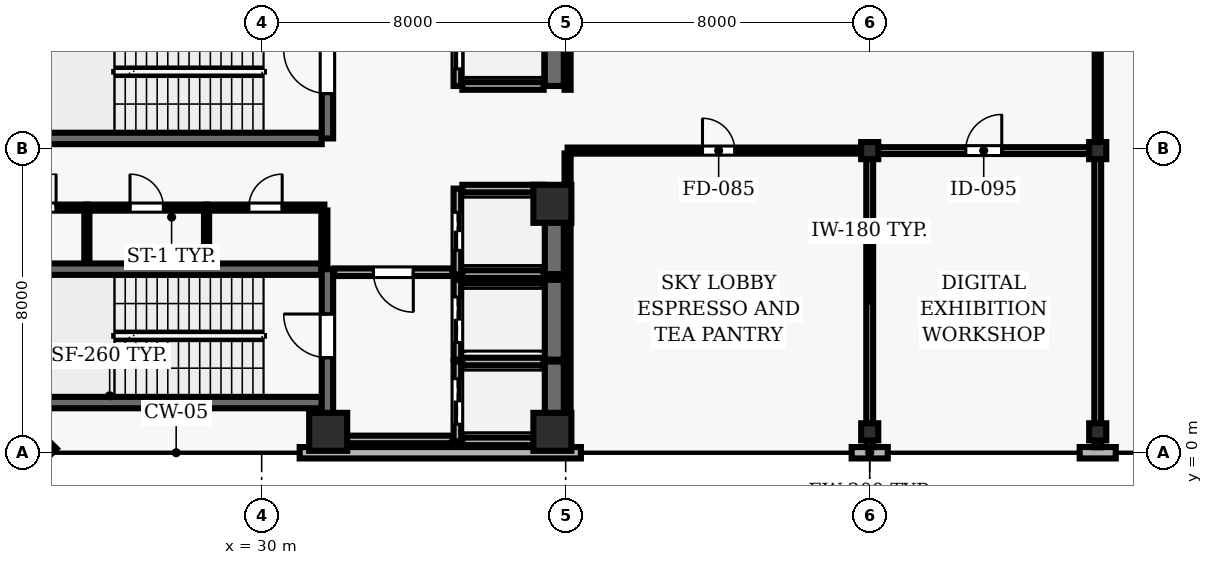
"""IFC4 building model, lengths in metres.
Left out: names, types, materials, properties, quantities, classifications, styles, units other than length and angle.
Written with IfcOpenShell. Run it as: python <this file> out.ifc"""

import sys

from ifc_helpers import new_model, si_unit, direction, frame, frame_2d, origin, origin_2d, place, context, subcontext, project, spatial, rectangle, hollow_rectangle, extrude, element, fill, save


model = new_model("IFC4")
c1 = context("Model", 3, precision=1e-05, world=origin(), true_north=direction((0.0, 1.0)))
c2 = subcontext(c1, "Body", "Model", "MODEL_VIEW")
j1 = project(units=[si_unit("LENGTHUNIT", "METRE"), si_unit("PLANEANGLEUNIT", "RADIAN")], contexts=[c1])
p1 = place(None, origin())
s1 = spatial("IfcSite", under=j1, at=p1, CompositionType="ELEMENT")
p2 = place(p1, origin())
s2 = spatial("IfcBuilding", under=s1, at=p2, CompositionType="ELEMENT")
p3 = place(p2, frame((0.0, 0.0, 170.8)))
s3 = spatial("IfcBuildingStorey", under=s2, at=p3, CompositionType="ELEMENT", Elevation=170.8)
for number, where, z_axis, x_axis in (
    (1, (31.75, 0.55, 0.0), (0.0, 0.0, 1.0), (1.0, 0.0, 0.0)),
    (2, (37.65, 0.55, 0.0), (0.0, 0.0, 1.0), (1.0, 0.0, 0.0)),
    (3, (37.65, 6.55, 0.0), (0.0, 0.0, 1.0), (1.0, 0.0, 0.0)),
):
    element("IfcColumn", number, at=place(p3, frame(where, z_axis=z_axis, x_axis=x_axis)), inside=s3, PredefinedType="COLUMN", context=c2, shape_type="SweptSolid", body=[
        extrude(rectangle(XDim=1.0, YDim=1.0, at=origin_2d()), origin(), (0.0, 0.0, 1.0), 5.0),
    ])
for number, where, z_axis, x_axis in (
    (4, (46.0, 0.55, 0.0), (0.0, 0.0, 1.0), (1.0, 0.0, 0.0)),
    (5, (46.0, 7.95, 0.0), (0.0, 0.0, 1.0), (1.0, 0.0, 0.0)),
    (6, (52.0, 0.55, 0.0), (0.0, 0.0, 1.0), (1.0, 0.0, 0.0)),
    (7, (52.0, 7.95, 0.0), (0.0, 0.0, 1.0), (1.0, 0.0, 0.0)),
):
    element("IfcColumn", number, at=place(p3, frame(where, z_axis=z_axis, x_axis=x_axis)), inside=s3, PredefinedType="COLUMN", context=c2, shape_type="SweptSolid", body=[
        extrude(hollow_rectangle(XDim=0.45, YDim=0.45, WallThickness=0.02, at=origin_2d()), origin(), (0.0, 0.0, 1.0), 5.0),
    ])
p4 = place(p3, frame((31.0, 0.0, 0.0), z_axis=(0.0, 0.0, 1.0), x_axis=(1.0, 0.0, 0.0)))
e8 = element("IfcWall", 8, at=p4, inside=s3, PredefinedType="SOLIDWALL", context=c2, shape_type="SweptSolid", body=[
    extrude(rectangle(XDim=7.4, YDim=0.3, at=frame_2d((3.7, 0.0))), origin(), (0.0, 0.0, 1.0), 4.79),
])
for number, where, z_axis, x_axis in (
    (9, (45.525, 0.0, 0.0), (0.0, 0.0, 1.0), (1.0, 0.0, 0.0)),
    (10, (51.525, 0.0, 0.0), (0.0, 0.0, 1.0), (1.0, 0.0, 0.0)),
):
    element("IfcWall", number, at=place(p3, frame(where, z_axis=z_axis, x_axis=x_axis)), inside=s3, PredefinedType="SOLIDWALL", context=c2, shape_type="SweptSolid", body=[
        extrude(rectangle(XDim=0.95, YDim=0.3, at=frame_2d((0.475, 0.0))), origin(), (0.0, 0.0, 1.0), 4.79),
    ])
p5 = place(p3, frame((22.0, 2.5, 0.0), z_axis=(0.0, 0.0, 1.0), x_axis=(0.707106781187, -0.707106781187, 0.0)))
e11 = element("IfcWall", 11, at=p5, inside=s3, PredefinedType="SOLIDWALL", context=c2, shape_type="SweptSolid", body=[
    extrude(rectangle(XDim=3.536, YDim=0.3, at=frame_2d((1.768, 0.0))), origin(), (0.0, 0.0, 1.0), 4.79),
])
for number, where, z_axis, x_axis in (
    (12, (31.58, 4.83, 0.0), (0.0, 0.0, 1.0), (-1.0, 0.0, 0.0)),
    (13, (23.22, 1.32, 0.0), (0.0, 0.0, 1.0), (1.0, 0.0, 0.0)),
):
    element("IfcWall", number, at=place(p3, frame(where, z_axis=z_axis, x_axis=x_axis)), inside=s3, PredefinedType="SHEAR", context=c2, shape_type="SweptSolid", body=[
        extrude(rectangle(XDim=8.36, YDim=0.3, at=frame_2d((4.18, 0.0))), origin(), (0.0, 0.0, 1.0), 4.79),
    ])
p6 = place(p3, frame((31.73, 0.96, 0.0), z_axis=(0.0, 0.0, 1.0), x_axis=(0.0, 1.0, 0.0)))
e14 = element("IfcWall", 14, at=p6, inside=s3, PredefinedType="SHEAR", context=c2, shape_type="SweptSolid", body=[
    extrude(rectangle(XDim=3.87, YDim=0.3, at=frame_2d((1.935, 0.0))), origin(), (0.0, 0.0, 1.0), 4.79),
])
p7 = place(p6, frame((1.54, 0.0, 0.0)))
e15 = element("IfcOpeningElement", 15, at=p7, cuts=e14, PredefinedType="OPENING", context=c2, shape_type="SweptSolid", body=[
    extrude(rectangle(XDim=1.15, YDim=2.15, at=frame_2d((0.575, 1.075))), frame((0.0, 0.16, 0.0), z_axis=(0.0, -1.0, 0.0), x_axis=(1.0, 0.0, 0.0)), (0.0, 0.0, 1.0), 0.32),
])
p8 = place(p3, frame((23.22, 8.27, 0.0), z_axis=(0.0, 0.0, 1.0), x_axis=(1.0, 0.0, 0.0)))
e16 = element("IfcWall", 16, at=p8, inside=s3, PredefinedType="SHEAR", context=c2, shape_type="SweptSolid", body=[
    extrude(rectangle(XDim=8.36, YDim=0.3, at=frame_2d((4.18, 0.0))), origin(), (0.0, 0.0, 1.0), 4.79),
])
p9 = place(p3, frame((31.73, 8.27, 0.0), z_axis=(0.0, 0.0, 1.0), x_axis=(0.0, 1.0, 0.0)))
e17 = element("IfcWall", 17, at=p9, inside=s3, PredefinedType="SHEAR", context=c2, shape_type="SweptSolid", body=[
    extrude(rectangle(XDim=3.51, YDim=0.3, at=frame_2d((1.755, 0.0))), origin(), (0.0, 0.0, 1.0), 4.79),
])
p10 = place(p9, frame((1.18, 0.0, 0.0)))
e18 = element("IfcOpeningElement", 18, at=p10, cuts=e17, PredefinedType="OPENING", context=c2, shape_type="SweptSolid", body=[
    extrude(rectangle(XDim=1.15, YDim=2.15, at=frame_2d((0.575, 1.075))), frame((0.0, 0.16, 0.0), z_axis=(0.0, -1.0, 0.0), x_axis=(1.0, 0.0, 0.0)), (0.0, 0.0, 1.0), 0.32),
])
p11 = place(p3, frame((35.15, 2.4, 0.0), z_axis=(0.0, 0.0, 1.0), x_axis=(0.0, -1.0, 0.0)))
e19 = element("IfcWall", 19, at=p11, inside=s3, PredefinedType="SOLIDWALL", context=c2, shape_type="SweptSolid", body=[
    extrude(rectangle(XDim=2.1, YDim=0.2, at=frame_2d((1.05, 0.0))), origin(), (0.0, 0.0, 1.0), 4.79),
])
p12 = place(p11, frame((0.45, 0.0, 0.0)))
e20 = element("IfcOpeningElement", 20, at=p12, cuts=e19, PredefinedType="OPENING", context=c2, shape_type="SweptSolid", body=[
    extrude(rectangle(XDim=1.2, YDim=2.15, at=frame_2d((0.6, 1.075))), frame((0.0, 0.11, 0.0), z_axis=(0.0, -1.0, 0.0), x_axis=(1.0, 0.0, 0.0)), (0.0, 0.0, 1.0), 0.22),
])
p13 = place(p3, frame((37.7, 0.3, 0.0), z_axis=(0.0, 0.0, 1.0), x_axis=(0.0, 1.0, 0.0)))
e21 = element("IfcWall", 21, at=p13, inside=s3, PredefinedType="SHEAR", context=c2, shape_type="SweptSolid", body=[
    extrude(rectangle(XDim=2.1, YDim=0.5, at=frame_2d((1.05, 0.0))), origin(), (0.0, 0.0, 1.0), 4.79),
])
for number, where, z_axis, x_axis in (
    (22, (35.28, 0.3, 0.0), (0.0, 0.0, 1.0), (1.0, 0.0, 0.0)),
    (23, (37.42, 2.4, 0.0), (0.0, 0.0, 1.0), (-1.0, 0.0, 0.0)),
):
    element("IfcWall", number, at=place(p3, frame(where, z_axis=z_axis, x_axis=x_axis)), inside=s3, PredefinedType="SOLIDWALL", context=c2, shape_type="SweptSolid", body=[
        extrude(rectangle(XDim=2.14, YDim=0.2, at=frame_2d((1.07, 0.0))), origin(), (0.0, 0.0, 1.0), 4.79),
    ])
p14 = place(p3, frame((35.15, 4.55, 0.0), z_axis=(0.0, 0.0, 1.0), x_axis=(0.0, -1.0, 0.0)))
e24 = element("IfcWall", 24, at=p14, inside=s3, PredefinedType="SOLIDWALL", context=c2, shape_type="SweptSolid", body=[
    extrude(rectangle(XDim=2.1, YDim=0.2, at=frame_2d((1.05, 0.0))), origin(), (0.0, 0.0, 1.0), 4.79),
])
p15 = place(p14, frame((0.45, 0.0, 0.0)))
e25 = element("IfcOpeningElement", 25, at=p15, cuts=e24, PredefinedType="OPENING", context=c2, shape_type="SweptSolid", body=[
    extrude(rectangle(XDim=1.2, YDim=2.15, at=frame_2d((0.6, 1.075))), frame((0.0, 0.11, 0.0), z_axis=(0.0, -1.0, 0.0), x_axis=(1.0, 0.0, 0.0)), (0.0, 0.0, 1.0), 0.22),
])
p16 = place(p3, frame((37.7, 2.45, 0.0), z_axis=(0.0, 0.0, 1.0), x_axis=(0.0, 1.0, 0.0)))
e26 = element("IfcWall", 26, at=p16, inside=s3, PredefinedType="SHEAR", context=c2, shape_type="SweptSolid", body=[
    extrude(rectangle(XDim=2.1, YDim=0.5, at=frame_2d((1.05, 0.0))), origin(), (0.0, 0.0, 1.0), 4.79),
])
p17 = place(p3, frame((37.42, 4.55, 0.0), z_axis=(0.0, 0.0, 1.0), x_axis=(-1.0, 0.0, 0.0)))
e27 = element("IfcWall", 27, at=p17, inside=s3, PredefinedType="SOLIDWALL", context=c2, shape_type="SweptSolid", body=[
    extrude(rectangle(XDim=2.14, YDim=0.2, at=frame_2d((1.07, 0.0))), origin(), (0.0, 0.0, 1.0), 4.79),
])
p18 = place(p3, frame((35.15, 6.95, 0.0), z_axis=(0.0, 0.0, 1.0), x_axis=(0.0, -1.0, 0.0)))
e28 = element("IfcWall", 28, at=p18, inside=s3, PredefinedType="SOLIDWALL", context=c2, shape_type="SweptSolid", body=[
    extrude(rectangle(XDim=2.25, YDim=0.2, at=frame_2d((1.125, 0.0))), origin(), (0.0, 0.0, 1.0), 4.79),
])
p19 = place(p18, frame((0.625, 0.0, 0.0)))
e29 = element("IfcOpeningElement", 29, at=p19, cuts=e28, PredefinedType="OPENING", context=c2, shape_type="SweptSolid", body=[
    extrude(rectangle(XDim=1.0, YDim=2.1, at=frame_2d((0.5, 1.05))), frame((0.0, 0.11, 0.0), z_axis=(0.0, -1.0, 0.0), x_axis=(1.0, 0.0, 0.0)), (0.0, 0.0, 1.0), 0.22),
])
p20 = place(p3, frame((37.7, 4.7, 0.0), z_axis=(0.0, 0.0, 1.0), x_axis=(0.0, 1.0, 0.0)))
e30 = element("IfcWall", 30, at=p20, inside=s3, PredefinedType="SHEAR", context=c2, shape_type="SweptSolid", body=[
    extrude(rectangle(XDim=2.25, YDim=0.5, at=frame_2d((1.125, 0.0))), origin(), (0.0, 0.0, 1.0), 4.79),
])
for number, where, z_axis, x_axis in (
    (31, (35.28, 4.7, 0.0), (0.0, 0.0, 1.0), (1.0, 0.0, 0.0)),
    (32, (37.42, 6.95, 0.0), (0.0, 0.0, 1.0), (-1.0, 0.0, 0.0)),
):
    element("IfcWall", number, at=place(p3, frame(where, z_axis=z_axis, x_axis=x_axis)), inside=s3, PredefinedType="SOLIDWALL", context=c2, shape_type="SweptSolid", body=[
        extrude(rectangle(XDim=2.14, YDim=0.2, at=frame_2d((1.07, 0.0))), origin(), (0.0, 0.0, 1.0), 4.79),
    ])
p21 = place(p3, frame((35.15, 11.55, 0.0), z_axis=(0.0, 0.0, 1.0), x_axis=(0.0, -1.0, 0.0)))
e33 = element("IfcWall", 33, at=p21, inside=s3, PredefinedType="SOLIDWALL", context=c2, shape_type="SweptSolid", body=[
    extrude(rectangle(XDim=1.9, YDim=0.2, at=frame_2d((0.95, 0.0))), origin(), (0.0, 0.0, 1.0), 4.79),
])
p22 = place(p21, frame((0.45, 0.0, 0.0)))
e34 = element("IfcOpeningElement", 34, at=p22, cuts=e33, PredefinedType="OPENING", context=c2, shape_type="SweptSolid", body=[
    extrude(rectangle(XDim=1.0, YDim=2.1, at=frame_2d((0.5, 1.05))), frame((0.0, 0.11, 0.0), z_axis=(0.0, -1.0, 0.0), x_axis=(1.0, 0.0, 0.0)), (0.0, 0.0, 1.0), 0.22),
])
p23 = place(p3, frame((37.7, 9.65, 0.0), z_axis=(0.0, 0.0, 1.0), x_axis=(0.0, 1.0, 0.0)))
e35 = element("IfcWall", 35, at=p23, inside=s3, PredefinedType="SHEAR", context=c2, shape_type="SweptSolid", body=[
    extrude(rectangle(XDim=1.9, YDim=0.5, at=frame_2d((0.95, 0.0))), origin(), (0.0, 0.0, 1.0), 4.79),
])
p24 = place(p3, frame((35.28, 9.65, 0.0), z_axis=(0.0, 0.0, 1.0), x_axis=(1.0, 0.0, 0.0)))
e36 = element("IfcWall", 36, at=p24, inside=s3, PredefinedType="SOLIDWALL", context=c2, shape_type="SweptSolid", body=[
    extrude(rectangle(XDim=2.14, YDim=0.2, at=frame_2d((1.07, 0.0))), origin(), (0.0, 0.0, 1.0), 4.79),
])
p25 = place(p3, frame((22.2, 6.45, 0.0), z_axis=(0.0, 0.0, 1.0), x_axis=(1.0, 0.0, 0.0)))
e37 = element("IfcWall", 37, at=p25, inside=s3, PredefinedType="PARTITIONING", context=c2, shape_type="SweptSolid", body=[
    extrude(rectangle(XDim=3.2, YDim=0.16, at=frame_2d((1.6, 0.0))), origin(), (0.0, 0.0, 1.0), 4.79),
])
p26 = place(p25, frame((1.51, 0.0, 0.0)))
e38 = element("IfcOpeningElement", 38, at=p26, cuts=e37, PredefinedType="OPENING", context=c2, shape_type="SweptSolid", body=[
    extrude(rectangle(XDim=0.88, YDim=2.1, at=frame_2d((0.44, 1.05))), frame((0.0, 0.09, 0.0), z_axis=(0.0, -1.0, 0.0), x_axis=(1.0, 0.0, 0.0)), (0.0, 0.0, 1.0), 0.18),
])
p27 = place(p3, frame((25.4, 6.45, 0.0), z_axis=(0.0, 0.0, 1.0), x_axis=(1.0, 0.0, 0.0)))
e39 = element("IfcWall", 39, at=p27, inside=s3, PredefinedType="PARTITIONING", context=c2, shape_type="SweptSolid", body=[
    extrude(rectangle(XDim=3.15, YDim=0.16, at=frame_2d((1.575, 0.0))), origin(), (0.0, 0.0, 1.0), 4.79),
])
p28 = place(p27, frame((1.135, 0.0, 0.0)))
e40 = element("IfcOpeningElement", 40, at=p28, cuts=e39, PredefinedType="OPENING", context=c2, shape_type="SweptSolid", body=[
    extrude(rectangle(XDim=0.88, YDim=2.1, at=frame_2d((0.44, 1.05))), frame((0.0, 0.09, 0.0), z_axis=(0.0, -1.0, 0.0), x_axis=(1.0, 0.0, 0.0)), (0.0, 0.0, 1.0), 0.18),
])
p29 = place(p3, frame((28.55, 6.45, 0.0), z_axis=(0.0, 0.0, 1.0), x_axis=(1.0, 0.0, 0.0)))
e41 = element("IfcWall", 41, at=p29, inside=s3, PredefinedType="PARTITIONING", context=c2, shape_type="SweptSolid", body=[
    extrude(rectangle(XDim=3.1, YDim=0.16, at=frame_2d((1.55, 0.0))), origin(), (0.0, 0.0, 1.0), 4.79),
])
p30 = place(p29, frame((1.11, 0.0, 0.0)))
e42 = element("IfcOpeningElement", 42, at=p30, cuts=e41, PredefinedType="OPENING", context=c2, shape_type="SweptSolid", body=[
    extrude(rectangle(XDim=0.88, YDim=2.1, at=frame_2d((0.44, 1.05))), frame((0.0, 0.09, 0.0), z_axis=(0.0, -1.0, 0.0), x_axis=(1.0, 0.0, 0.0)), (0.0, 0.0, 1.0), 0.18),
])
p31 = place(p3, frame((31.65, 0.35, 0.0), z_axis=(0.0, 0.0, 1.0), x_axis=(1.0, 0.0, 0.0)))
e43 = element("IfcWall", 43, at=p31, inside=s3, PredefinedType="SOLIDWALL", context=c2, shape_type="SweptSolid", body=[
    extrude(rectangle(XDim=3.37, YDim=0.2, at=frame_2d((1.685, 0.0))), origin(), (0.0, 0.0, 1.0), 4.79),
])
p32 = place(p3, frame((35.02, 4.75, 0.0), z_axis=(0.0, 0.0, 1.0), x_axis=(-1.0, 0.0, 0.0)))
e44 = element("IfcWall", 44, at=p32, inside=s3, PredefinedType="SOLIDWALL", context=c2, shape_type="SweptSolid", body=[
    extrude(rectangle(XDim=3.11, YDim=0.2, at=frame_2d((1.555, 0.0))), origin(), (0.0, 0.0, 1.0), 4.79),
])
p33 = place(p32, frame((1.03, 0.0, 0.0)))
e45 = element("IfcOpeningElement", 45, at=p33, cuts=e44, PredefinedType="OPENING", context=c2, shape_type="SweptSolid", body=[
    extrude(rectangle(XDim=1.05, YDim=2.15, at=frame_2d((0.525, 1.075))), frame((0.0, 0.11, 0.0), z_axis=(0.0, -1.0, 0.0), x_axis=(1.0, 0.0, 0.0)), (0.0, 0.0, 1.0), 0.22),
])
p34 = place(p3, frame((38.05, 7.95, 0.0), z_axis=(0.0, 0.0, 1.0), x_axis=(1.0, 0.0, 0.0)))
e46 = element("IfcWall", 46, at=p34, inside=s3, PredefinedType="PARTITIONING", context=c2, shape_type="SweptSolid", body=[
    extrude(rectangle(XDim=7.95, YDim=0.16, at=frame_2d((3.975, 0.0))), origin(), (0.0, 0.0, 1.0), 4.246),
])
p35 = place(p34, frame((3.55, 0.0, 0.0)))
e47 = element("IfcOpeningElement", 47, at=p35, cuts=e46, PredefinedType="OPENING", context=c2, shape_type="SweptSolid", body=[
    extrude(rectangle(XDim=0.85, YDim=2.1, at=frame_2d((0.425, 1.05))), frame((0.0, 0.09, 0.0), z_axis=(0.0, -1.0, 0.0), x_axis=(1.0, 0.0, 0.0)), (0.0, 0.0, 1.0), 0.18),
])
p36 = place(p3, frame((46.0, 7.95, 0.0), z_axis=(0.0, 0.0, 1.0), x_axis=(1.0, 0.0, 0.0)))
e48 = element("IfcWall", 48, at=p36, inside=s3, PredefinedType="PARTITIONING", context=c2, shape_type="SweptSolid", body=[
    extrude(rectangle(XDim=6.0, YDim=0.18, at=frame_2d((3.0, 0.0))), origin(), (0.0, 0.0, 1.0), 4.246),
])
p37 = place(p36, frame((2.525, 0.0, 0.0)))
e49 = element("IfcOpeningElement", 49, at=p37, cuts=e48, PredefinedType="OPENING", context=c2, shape_type="SweptSolid", body=[
    extrude(rectangle(XDim=0.95, YDim=2.1, at=frame_2d((0.475, 1.05))), frame((0.0, 0.1, 0.0), z_axis=(0.0, -1.0, 0.0), x_axis=(1.0, 0.0, 0.0)), (0.0, 0.0, 1.0), 0.2),
])
for number, where, z_axis, x_axis in (
    (50, (25.4, 5.01, 0.0), (0.0, 0.0, 1.0), (0.0, 1.0, 0.0)),
    (51, (28.55, 5.01, 0.0), (0.0, 0.0, 1.0), (0.0, 1.0, 0.0)),
):
    element("IfcWall", number, at=place(p3, frame(where, z_axis=z_axis, x_axis=x_axis)), inside=s3, PredefinedType="PARTITIONING", context=c2, shape_type="SweptSolid", body=[
        extrude(rectangle(XDim=1.365, YDim=0.135, at=frame_2d((0.683, 0.0))), origin(), (0.0, 0.0, 1.0), 4.79),
    ])
p38 = place(p3, frame((31.65, 4.86, 0.0), z_axis=(0.0, 0.0, 1.0), x_axis=(0.0, 1.0, 0.0)))
e52 = element("IfcWall", 52, at=p38, inside=s3, PredefinedType="PARTITIONING", context=c2, shape_type="SweptSolid", body=[
    extrude(rectangle(XDim=1.515, YDim=0.16, at=frame_2d((0.757, 0.0))), origin(), (0.0, 0.0, 1.0), 4.79),
])
p39 = place(p3, frame((38.05, 7.05, 0.0), z_axis=(0.0, 0.0, 1.0), x_axis=(0.0, 1.0, 0.0)))
e53 = element("IfcWall", 53, at=p39, inside=s3, PredefinedType="PARTITIONING", context=c2, shape_type="SweptSolid", body=[
    extrude(rectangle(XDim=0.825, YDim=0.16, at=frame_2d((0.413, 0.0))), origin(), (0.0, 0.0, 1.0), 4.246),
])
p40 = place(p3, frame((38.05, 7.05, 0.0), z_axis=(0.0, 0.0, 1.0), x_axis=(0.0, -1.0, 0.0)))
e54 = element("IfcWall", 54, at=p40, inside=s3, PredefinedType="PARTITIONING", context=c2, shape_type="SweptSolid", body=[
    extrude(rectangle(XDim=6.905, YDim=0.16, at=frame_2d((3.453, 0.0))), origin(), (0.0, 0.0, 1.0), 4.246),
])
p41 = place(p3, frame((38.05, 15.925, 0.0), z_axis=(0.0, 0.0, 1.0), x_axis=(0.0, -1.0, 0.0)))
e55 = element("IfcWall", 55, at=p41, inside=s3, PredefinedType="PARTITIONING", context=c2, shape_type="SweptSolid", body=[
    extrude(rectangle(XDim=6.375, YDim=0.16, at=frame_2d((3.188, 0.0))), origin(), (0.0, 0.0, 1.0), 4.246),
])
for number, where, z_axis, x_axis in (
    (56, (46.0, 0.145, 0.0), (0.0, 0.0, 1.0), (0.0, 1.0, 0.0)),
    (57, (52.0, 7.865, 0.0), (0.0, 0.0, 1.0), (0.0, -1.0, 0.0)),
):
    element("IfcWall", number, at=place(p3, frame(where, z_axis=z_axis, x_axis=x_axis)), inside=s3, PredefinedType="PARTITIONING", context=c2, shape_type="SweptSolid", body=[
        extrude(rectangle(XDim=7.72, YDim=0.18, at=frame_2d((3.86, 0.0))), origin(), (0.0, 0.0, 1.0), 4.246),
    ])
p42 = place(p3, frame((52.0, 8.035, 0.0), z_axis=(0.0, 0.0, 1.0), x_axis=(0.0, 1.0, 0.0)))
e58 = element("IfcWall", 58, at=p42, inside=s3, PredefinedType="PARTITIONING", context=c2, shape_type="SweptSolid", body=[
    extrude(rectangle(XDim=7.82, YDim=0.16, at=frame_2d((3.91, 0.0))), origin(), (0.0, 0.0, 1.0), 4.246),
])
p43 = place(p42, frame((3.46, 0.0, 0.0)))
e59 = element("IfcOpeningElement", 59, at=p43, cuts=e58, PredefinedType="OPENING", context=c2, shape_type="SweptSolid", body=[
    extrude(rectangle(XDim=0.9, YDim=2.1, at=frame_2d((0.45, 1.05))), frame((0.0, 0.09, 0.0), z_axis=(0.0, -1.0, 0.0), x_axis=(1.0, 0.0, 0.0)), (0.0, 0.0, 1.0), 0.18),
])
p44 = place(p7, origin())
e60 = element("IfcDoor", 60, at=p44, inside=s3, OperationType="SINGLE_SWING_RIGHT", PredefinedType="DOOR", context=c2, shape_type="SweptSolid", body=[
    extrude(rectangle(XDim=1.15, YDim=2.15, at=frame_2d((0.575, 1.075))), frame((0.0, 0.025, 0.0), z_axis=(0.0, -1.0, 0.0), x_axis=(1.0, 0.0, 0.0)), (0.0, 0.0, 1.0), 0.05),
])
fill(e15, e60)
p45 = place(p10, origin())
e61 = element("IfcDoor", 61, at=p45, inside=s3, OperationType="SINGLE_SWING_RIGHT", PredefinedType="DOOR", context=c2, shape_type="SweptSolid", body=[
    extrude(rectangle(XDim=1.15, YDim=2.15, at=frame_2d((0.575, 1.075))), frame((0.0, 0.025, 0.0), z_axis=(0.0, -1.0, 0.0), x_axis=(1.0, 0.0, 0.0)), (0.0, 0.0, 1.0), 0.05),
])
fill(e18, e61)
p46 = place(p12, origin())
e62 = element("IfcDoor", 62, at=p46, inside=s3, OperationType="DOUBLE_DOOR_SLIDING", PredefinedType="DOOR", context=c2, shape_type="SweptSolid", body=[
    extrude(rectangle(XDim=1.2, YDim=2.15, at=frame_2d((0.6, 1.075))), frame((0.0, 0.025, 0.0), z_axis=(0.0, -1.0, 0.0), x_axis=(1.0, 0.0, 0.0)), (0.0, 0.0, 1.0), 0.05),
])
fill(e20, e62)
p47 = place(p15, origin())
e63 = element("IfcDoor", 63, at=p47, inside=s3, OperationType="DOUBLE_DOOR_SLIDING", PredefinedType="DOOR", context=c2, shape_type="SweptSolid", body=[
    extrude(rectangle(XDim=1.2, YDim=2.15, at=frame_2d((0.6, 1.075))), frame((0.0, 0.025, 0.0), z_axis=(0.0, -1.0, 0.0), x_axis=(1.0, 0.0, 0.0)), (0.0, 0.0, 1.0), 0.05),
])
fill(e25, e63)
p48 = place(p19, origin())
e64 = element("IfcDoor", 64, at=p48, inside=s3, OperationType="DOUBLE_DOOR_SLIDING", PredefinedType="DOOR", context=c2, shape_type="SweptSolid", body=[
    extrude(rectangle(XDim=1.0, YDim=2.1, at=frame_2d((0.5, 1.05))), frame((0.0, 0.025, 0.0), z_axis=(0.0, -1.0, 0.0), x_axis=(1.0, 0.0, 0.0)), (0.0, 0.0, 1.0), 0.05),
])
fill(e29, e64)
p49 = place(p22, origin())
e65 = element("IfcDoor", 65, at=p49, inside=s3, OperationType="DOUBLE_DOOR_SLIDING", PredefinedType="DOOR", context=c2, shape_type="SweptSolid", body=[
    extrude(rectangle(XDim=1.0, YDim=2.1, at=frame_2d((0.5, 1.05))), frame((0.0, 0.025, 0.0), z_axis=(0.0, -1.0, 0.0), x_axis=(1.0, 0.0, 0.0)), (0.0, 0.0, 1.0), 0.05),
])
fill(e34, e65)
p50 = place(p33, origin())
e66 = element("IfcDoor", 66, at=p50, inside=s3, OperationType="SINGLE_SWING_LEFT", PredefinedType="DOOR", context=c2, shape_type="SweptSolid", body=[
    extrude(rectangle(XDim=1.05, YDim=2.15, at=frame_2d((0.525, 1.075))), frame((0.0, 0.025, 0.0), z_axis=(0.0, -1.0, 0.0), x_axis=(1.0, 0.0, 0.0)), (0.0, 0.0, 1.0), 0.05),
])
fill(e45, e66)
p51 = place(p26, origin())
e67 = element("IfcDoor", 67, at=p51, inside=s3, OperationType="SINGLE_SWING_RIGHT", PredefinedType="DOOR", context=c2, shape_type="SweptSolid", body=[
    extrude(rectangle(XDim=0.88, YDim=2.1, at=frame_2d((0.44, 1.05))), frame((0.0, 0.025, 0.0), z_axis=(0.0, -1.0, 0.0), x_axis=(1.0, 0.0, 0.0)), (0.0, 0.0, 1.0), 0.05),
])
fill(e38, e67)
p52 = place(p28, origin())
e68 = element("IfcDoor", 68, at=p52, inside=s3, OperationType="SINGLE_SWING_LEFT", PredefinedType="DOOR", context=c2, shape_type="SweptSolid", body=[
    extrude(rectangle(XDim=0.88, YDim=2.1, at=frame_2d((0.44, 1.05))), frame((0.0, 0.025, 0.0), z_axis=(0.0, -1.0, 0.0), x_axis=(1.0, 0.0, 0.0)), (0.0, 0.0, 1.0), 0.05),
])
fill(e40, e68)
p53 = place(p30, origin())
e69 = element("IfcDoor", 69, at=p53, inside=s3, OperationType="SINGLE_SWING_RIGHT", PredefinedType="DOOR", context=c2, shape_type="SweptSolid", body=[
    extrude(rectangle(XDim=0.88, YDim=2.1, at=frame_2d((0.44, 1.05))), frame((0.0, 0.025, 0.0), z_axis=(0.0, -1.0, 0.0), x_axis=(1.0, 0.0, 0.0)), (0.0, 0.0, 1.0), 0.05),
])
fill(e42, e69)
p54 = place(p35, origin())
e70 = element("IfcDoor", 70, at=p54, inside=s3, OperationType="SINGLE_SWING_LEFT", PredefinedType="DOOR", context=c2, shape_type="SweptSolid", body=[
    extrude(rectangle(XDim=0.85, YDim=2.1, at=frame_2d((0.425, 1.05))), frame((0.0, 0.025, 0.0), z_axis=(0.0, -1.0, 0.0), x_axis=(1.0, 0.0, 0.0)), (0.0, 0.0, 1.0), 0.05),
])
fill(e47, e70)
p55 = place(p37, origin())
e71 = element("IfcDoor", 71, at=p55, inside=s3, OperationType="SINGLE_SWING_RIGHT", PredefinedType="DOOR", context=c2, shape_type="SweptSolid", body=[
    extrude(rectangle(XDim=0.95, YDim=2.1, at=frame_2d((0.475, 1.05))), frame((0.0, 0.025, 0.0), z_axis=(0.0, -1.0, 0.0), x_axis=(1.0, 0.0, 0.0)), (0.0, 0.0, 1.0), 0.05),
])
fill(e49, e71)
save(model, sys.argv[1])
